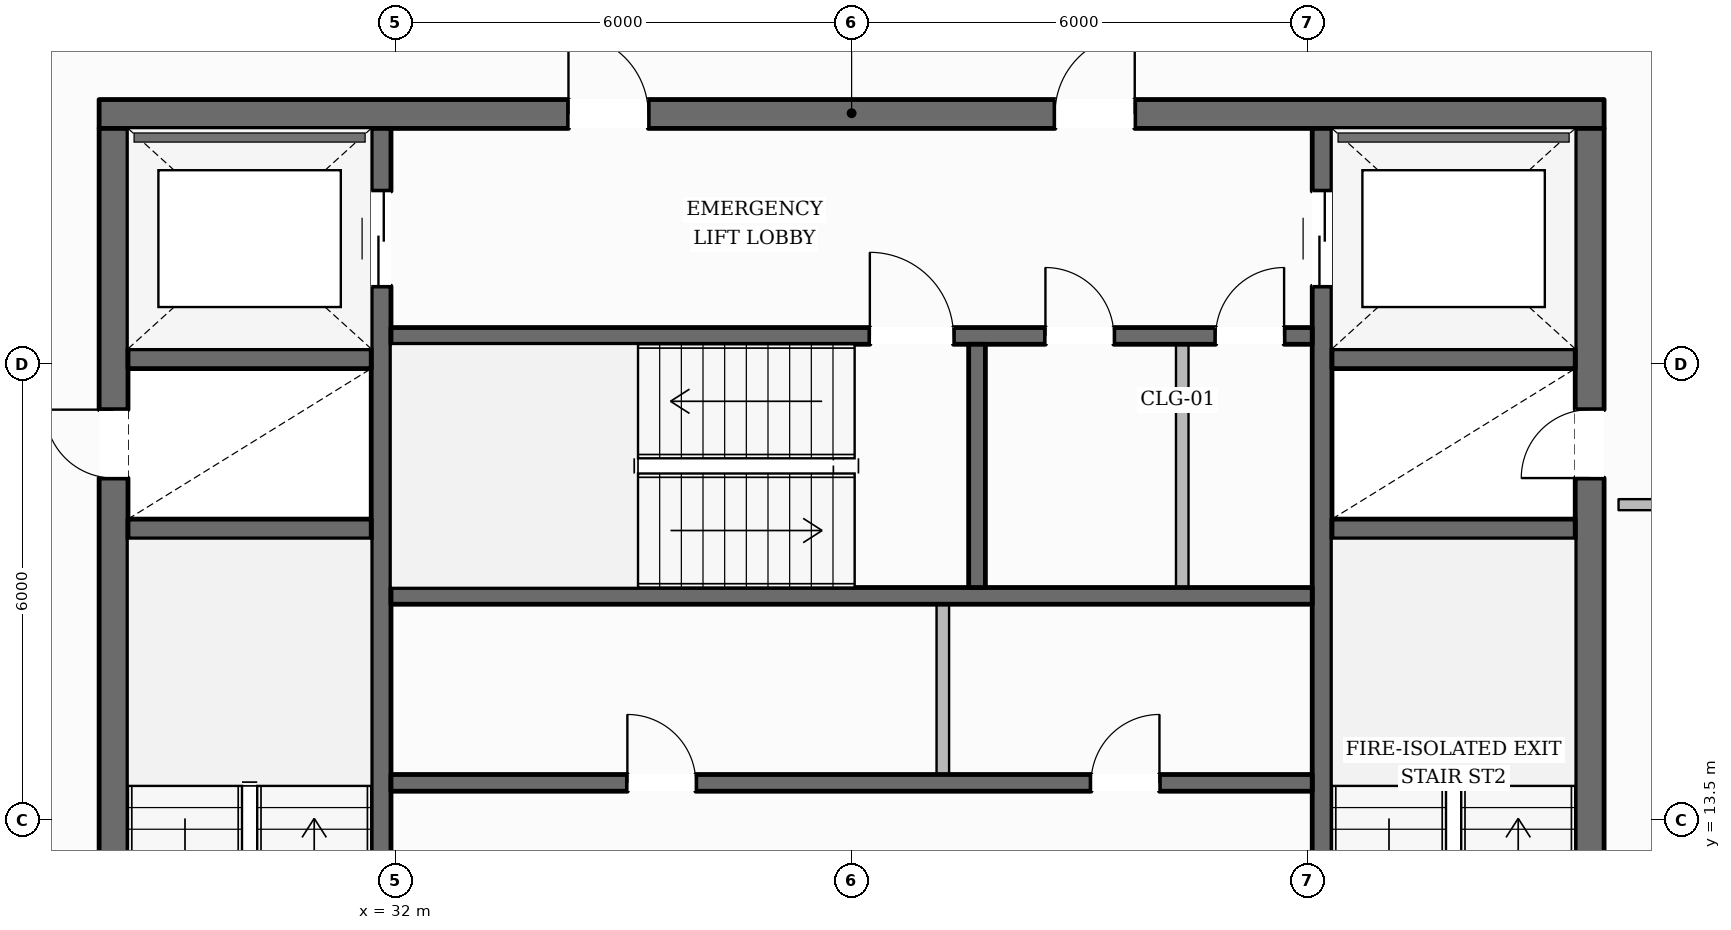
"""IFC4 building model, lengths in metres.
Left out: names, types, materials, properties, quantities, classifications, styles, units other than length and angle.
Written with IfcOpenShell. Run it as: python <this file> out.ifc"""

import sys

from ifc_helpers import new_model, si_unit, direction, frame, frame_2d, origin, place, context, subcontext, project, spatial, rectangle, extrude, element, fill, save


model = new_model("IFC4")
c1 = context("Model", 3, precision=1e-05, world=origin(), true_north=direction((0.0, 1.0)))
c2 = subcontext(c1, "Body", "Model", "MODEL_VIEW")
j1 = project(units=[si_unit("LENGTHUNIT", "METRE"), si_unit("PLANEANGLEUNIT", "RADIAN")], contexts=[c1])
p1 = place(None, origin())
s1 = spatial("IfcSite", under=j1, at=p1, CompositionType="ELEMENT")
p2 = place(p1, origin())
s2 = spatial("IfcBuilding", under=s1, at=p2, CompositionType="ELEMENT")
p3 = place(p2, frame((0.0, 0.0, 281.85)))
s3 = spatial("IfcBuildingStorey", under=s2, at=p3, CompositionType="ELEMENT", Elevation=281.85)
p4 = place(p3, frame((28.1, 22.79, 0.0), z_axis=(0.0, 0.0, 1.0), x_axis=(1.0, 0.0, 0.0)))
e1 = element("IfcWall", 1, at=p4, inside=s3, PredefinedType="SOLIDWALL", context=c2, shape_type="SweptSolid", body=[
    extrude(rectangle(XDim=19.8, YDim=0.38, at=frame_2d((9.9, 0.0))), origin(), (0.0, 0.0, 1.0), 3.61),
])
p5 = place(p4, frame((6.175, 0.0, 0.0)))
e2 = element("IfcOpeningElement", 2, at=p5, cuts=e1, PredefinedType="OPENING", context=c2, shape_type="SweptSolid", body=[
    extrude(rectangle(XDim=1.05, YDim=2.15, at=frame_2d((0.525, 1.075))), frame((0.0, 0.2, 0.0), z_axis=(0.0, -1.0, 0.0), x_axis=(1.0, 0.0, 0.0)), (0.0, 0.0, 1.0), 0.4),
])
p6 = place(p4, frame((12.575, 0.0, 0.0)))
e3 = element("IfcOpeningElement", 3, at=p6, cuts=e1, PredefinedType="OPENING", context=c2, shape_type="SweptSolid", body=[
    extrude(rectangle(XDim=1.05, YDim=2.15, at=frame_2d((0.525, 1.075))), frame((0.0, 0.2, 0.0), z_axis=(0.0, -1.0, 0.0), x_axis=(1.0, 0.0, 0.0)), (0.0, 0.0, 1.0), 0.4),
])
p7 = place(p3, frame((28.29, 9.6, 0.0), z_axis=(0.0, 0.0, 1.0), x_axis=(0.0, 1.0, 0.0)))
e4 = element("IfcWall", 4, at=p7, inside=s3, PredefinedType="SOLIDWALL", context=c2, shape_type="SweptSolid", body=[
    extrude(rectangle(XDim=13.0, YDim=0.38, at=frame_2d((6.5, 0.0))), origin(), (0.0, 0.0, 1.0), 3.61),
])
p8 = place(p7, frame((0.2, 0.0, 0.0)))
e5 = element("IfcOpeningElement", 5, at=p8, cuts=e4, PredefinedType="OPENING", context=c2, shape_type="SweptSolid", body=[
    extrude(rectangle(XDim=1.1, YDim=2.15, at=frame_2d((0.55, 1.075))), frame((0.0, 0.2, 0.0), z_axis=(0.0, -1.0, 0.0), x_axis=(1.0, 0.0, 0.0)), (0.0, 0.0, 1.0), 0.4),
])
p9 = place(p7, frame((8.4, 0.0, 0.0)))
e6 = element("IfcOpeningElement", 6, at=p9, cuts=e4, PredefinedType="OPENING", context=c2, shape_type="SweptSolid", body=[
    extrude(rectangle(XDim=0.9, YDim=2.1, at=frame_2d((0.45, 1.05))), frame((0.0, 0.2, 0.0), z_axis=(0.0, -1.0, 0.0), x_axis=(1.0, 0.0, 0.0)), (0.0, 0.0, 1.0), 0.4),
])
p10 = place(p3, frame((47.71, 9.6, 0.0), z_axis=(0.0, 0.0, 1.0), x_axis=(0.0, 1.0, 0.0)))
e7 = element("IfcWall", 7, at=p10, inside=s3, PredefinedType="SOLIDWALL", context=c2, shape_type="SweptSolid", body=[
    extrude(rectangle(XDim=13.0, YDim=0.38, at=frame_2d((6.5, 0.0))), origin(), (0.0, 0.0, 1.0), 3.61),
])
p11 = place(p10, frame((0.2, 0.0, 0.0)))
e8 = element("IfcOpeningElement", 8, at=p11, cuts=e7, PredefinedType="OPENING", context=c2, shape_type="SweptSolid", body=[
    extrude(rectangle(XDim=1.1, YDim=2.15, at=frame_2d((0.55, 1.075))), frame((0.0, 0.2, 0.0), z_axis=(0.0, -1.0, 0.0), x_axis=(1.0, 0.0, 0.0)), (0.0, 0.0, 1.0), 0.4),
])
p12 = place(p10, frame((8.4, 0.0, 0.0)))
e9 = element("IfcOpeningElement", 9, at=p12, cuts=e7, PredefinedType="OPENING", context=c2, shape_type="SweptSolid", body=[
    extrude(rectangle(XDim=0.9, YDim=2.1, at=frame_2d((0.45, 1.05))), frame((0.0, 0.2, 0.0), z_axis=(0.0, -1.0, 0.0), x_axis=(1.0, 0.0, 0.0)), (0.0, 0.0, 1.0), 0.4),
])
p13 = place(p3, frame((31.81, 9.6, 0.0), z_axis=(0.0, 0.0, 1.0), x_axis=(0.0, 1.0, 0.0)))
e10 = element("IfcWall", 10, at=p13, inside=s3, PredefinedType="SHEAR", context=c2, shape_type="SweptSolid", body=[
    extrude(rectangle(XDim=13.0, YDim=0.26, at=frame_2d((6.5, 0.0))), origin(), (0.0, 0.0, 1.0), 3.61),
])
p14 = place(p13, frame((10.925, 0.0, 0.0)))
e11 = element("IfcOpeningElement", 11, at=p14, cuts=e10, PredefinedType="OPENING", context=c2, shape_type="SweptSolid", body=[
    extrude(rectangle(XDim=1.25, YDim=2.25, at=frame_2d((0.625, 1.125))), frame((0.0, 0.14, 0.0), z_axis=(0.0, -1.0, 0.0), x_axis=(1.0, 0.0, 0.0)), (0.0, 0.0, 1.0), 0.28),
])
p15 = place(p3, frame((44.19, 9.6, 0.0), z_axis=(0.0, 0.0, 1.0), x_axis=(0.0, 1.0, 0.0)))
e12 = element("IfcWall", 12, at=p15, inside=s3, PredefinedType="SHEAR", context=c2, shape_type="SweptSolid", body=[
    extrude(rectangle(XDim=13.0, YDim=0.26, at=frame_2d((6.5, 0.0))), origin(), (0.0, 0.0, 1.0), 3.61),
])
p16 = place(p15, frame((10.925, 0.0, 0.0)))
e13 = element("IfcOpeningElement", 13, at=p16, cuts=e12, PredefinedType="OPENING", context=c2, shape_type="SweptSolid", body=[
    extrude(rectangle(XDim=1.25, YDim=2.25, at=frame_2d((0.625, 1.125))), frame((0.0, 0.14, 0.0), z_axis=(0.0, -1.0, 0.0), x_axis=(1.0, 0.0, 0.0)), (0.0, 0.0, 1.0), 0.28),
])
for number, where, z_axis, x_axis in (
    (14, (28.48, 17.33, 0.0), (0.0, 0.0, 1.0), (1.0, 0.0, 0.0)),
    (15, (28.48, 19.57, 0.0), (0.0, 0.0, 1.0), (1.0, 0.0, 0.0)),
    (16, (44.32, 17.33, 0.0), (0.0, 0.0, 1.0), (1.0, 0.0, 0.0)),
    (17, (44.32, 19.57, 0.0), (0.0, 0.0, 1.0), (1.0, 0.0, 0.0)),
):
    element("IfcWall", number, at=place(p3, frame(where, z_axis=z_axis, x_axis=x_axis)), inside=s3, PredefinedType="SHEAR", context=c2, shape_type="SweptSolid", body=[
        extrude(rectangle(XDim=3.2, YDim=0.26, at=frame_2d((1.6, 0.0))), origin(), (0.0, 0.0, 1.0), 3.61),
    ])
p17 = place(p3, frame((31.94, 19.87, 0.0), z_axis=(0.0, 0.0, 1.0), x_axis=(1.0, 0.0, 0.0)))
e18 = element("IfcWall", 18, at=p17, inside=s3, PredefinedType="SOLIDWALL", context=c2, shape_type="SweptSolid", body=[
    extrude(rectangle(XDim=12.12, YDim=0.22, at=frame_2d((6.06, 0.0))), origin(), (0.0, 0.0, 1.0), 3.61),
])
p18 = place(p17, frame((6.3, 0.0, 0.0)))
e19 = element("IfcOpeningElement", 19, at=p18, cuts=e18, PredefinedType="OPENING", context=c2, shape_type="SweptSolid", body=[
    extrude(rectangle(XDim=1.1, YDim=2.15, at=frame_2d((0.55, 1.075))), frame((0.0, 0.12, 0.0), z_axis=(0.0, -1.0, 0.0), x_axis=(1.0, 0.0, 0.0)), (0.0, 0.0, 1.0), 0.24),
])
p19 = place(p17, frame((8.61, 0.0, 0.0)))
e20 = element("IfcOpeningElement", 20, at=p19, cuts=e18, PredefinedType="OPENING", context=c2, shape_type="SweptSolid", body=[
    extrude(rectangle(XDim=0.9, YDim=2.1, at=frame_2d((0.45, 1.05))), frame((0.0, 0.12, 0.0), z_axis=(0.0, -1.0, 0.0), x_axis=(1.0, 0.0, 0.0)), (0.0, 0.0, 1.0), 0.24),
])
p20 = place(p17, frame((10.85, 0.0, 0.0)))
e21 = element("IfcOpeningElement", 21, at=p20, cuts=e18, PredefinedType="OPENING", context=c2, shape_type="SweptSolid", body=[
    extrude(rectangle(XDim=0.9, YDim=2.1, at=frame_2d((0.45, 1.05))), frame((0.0, 0.12, 0.0), z_axis=(0.0, -1.0, 0.0), x_axis=(1.0, 0.0, 0.0)), (0.0, 0.0, 1.0), 0.24),
])
p21 = place(p3, frame((31.94, 16.45, 0.0), z_axis=(0.0, 0.0, 1.0), x_axis=(1.0, 0.0, 0.0)))
e22 = element("IfcWall", 22, at=p21, inside=s3, PredefinedType="SOLIDWALL", context=c2, shape_type="SweptSolid", body=[
    extrude(rectangle(XDim=12.12, YDim=0.22, at=frame_2d((6.06, 0.0))), origin(), (0.0, 0.0, 1.0), 3.61),
])
p22 = place(p3, frame((39.65, 16.56, 0.0), z_axis=(0.0, 0.0, 1.0), x_axis=(0.0, 1.0, 0.0)))
e23 = element("IfcWall", 23, at=p22, inside=s3, PredefinedType="SOLIDWALL", context=c2, shape_type="SweptSolid", body=[
    extrude(rectangle(XDim=3.2, YDim=0.22, at=frame_2d((1.6, 0.0))), origin(), (0.0, 0.0, 1.0), 3.61),
])
p23 = place(p3, frame((31.94, 13.99, 0.0), z_axis=(0.0, 0.0, 1.0), x_axis=(1.0, 0.0, 0.0)))
e24 = element("IfcWall", 24, at=p23, inside=s3, PredefinedType="SOLIDWALL", context=c2, shape_type="SweptSolid", body=[
    extrude(rectangle(XDim=12.12, YDim=0.22, at=frame_2d((6.06, 0.0))), origin(), (0.0, 0.0, 1.0), 3.61),
])
p24 = place(p23, frame((3.11, 0.0, 0.0)))
e25 = element("IfcOpeningElement", 25, at=p24, cuts=e24, PredefinedType="OPENING", context=c2, shape_type="SweptSolid", body=[
    extrude(rectangle(XDim=0.9, YDim=2.1, at=frame_2d((0.45, 1.05))), frame((0.0, 0.12, 0.0), z_axis=(0.0, -1.0, 0.0), x_axis=(1.0, 0.0, 0.0)), (0.0, 0.0, 1.0), 0.24),
])
p25 = place(p23, frame((9.21, 0.0, 0.0)))
e26 = element("IfcOpeningElement", 26, at=p25, cuts=e24, PredefinedType="OPENING", context=c2, shape_type="SweptSolid", body=[
    extrude(rectangle(XDim=0.9, YDim=2.1, at=frame_2d((0.45, 1.05))), frame((0.0, 0.12, 0.0), z_axis=(0.0, -1.0, 0.0), x_axis=(1.0, 0.0, 0.0)), (0.0, 0.0, 1.0), 0.24),
])
p26 = place(p3, frame((15.219, 10.076, 0.0), z_axis=(0.0, 0.0, 1.0), x_axis=(0.509799642177, 0.860293162147, 0.0)))
e27 = element("IfcWall", 27, at=p26, inside=s3, PredefinedType="STANDARD", context=c2, shape_type="SweptSolid", body=[
    extrude(rectangle(XDim=38.963, YDim=0.35, at=frame_2d((19.481, 0.0))), origin(), (0.0, 0.0, 1.0), 3.196),
])
p27 = place(p26, frame((34.65, 0.0, 0.65)))
e28 = element("IfcOpeningElement", 28, at=p27, cuts=e27, PredefinedType="OPENING", context=c2, shape_type="SweptSolid", body=[
    extrude(rectangle(XDim=1.35, YDim=1.75, at=frame_2d((0.675, 0.875))), frame((0.0, 0.185, 0.0), z_axis=(0.0, -1.0, 0.0), x_axis=(1.0, 0.0, 0.0)), (0.0, 0.0, 1.0), 0.37),
])
p28 = place(p26, frame((28.314, 0.0, 0.65)))
e29 = element("IfcOpeningElement", 29, at=p28, cuts=e27, PredefinedType="OPENING", context=c2, shape_type="SweptSolid", body=[
    extrude(rectangle(XDim=1.35, YDim=1.75, at=frame_2d((0.675, 0.875))), frame((0.0, 0.185, 0.0), z_axis=(0.0, -1.0, 0.0), x_axis=(1.0, 0.0, 0.0)), (0.0, 0.0, 1.0), 0.37),
])
p29 = place(p26, frame((15.645, 0.0, 0.65)))
e30 = element("IfcOpeningElement", 30, at=p29, cuts=e27, PredefinedType="OPENING", context=c2, shape_type="SweptSolid", body=[
    extrude(rectangle(XDim=1.35, YDim=1.75, at=frame_2d((0.675, 0.875))), frame((0.0, 0.185, 0.0), z_axis=(0.0, -1.0, 0.0), x_axis=(1.0, 0.0, 0.0)), (0.0, 0.0, 1.0), 0.37),
])
p30 = place(p26, frame((9.309, 0.0, 0.65)))
e31 = element("IfcOpeningElement", 31, at=p30, cuts=e27, PredefinedType="OPENING", context=c2, shape_type="SweptSolid", body=[
    extrude(rectangle(XDim=1.35, YDim=1.75, at=frame_2d((0.675, 0.875))), frame((0.0, 0.185, 0.0), z_axis=(0.0, -1.0, 0.0), x_axis=(1.0, 0.0, 0.0)), (0.0, 0.0, 1.0), 0.37),
])
p31 = place(p26, frame((2.974, 0.0, 0.65)))
e32 = element("IfcOpeningElement", 32, at=p31, cuts=e27, PredefinedType="OPENING", context=c2, shape_type="SweptSolid", body=[
    extrude(rectangle(XDim=1.35, YDim=1.75, at=frame_2d((0.675, 0.875))), frame((0.0, 0.185, 0.0), z_axis=(0.0, -1.0, 0.0), x_axis=(1.0, 0.0, 0.0)), (0.0, 0.0, 1.0), 0.37),
])
p32 = place(p3, frame((40.827, 43.65, 0.0), z_axis=(0.0, 0.0, 1.0), x_axis=(0.502670175865, -0.864478278672, 0.0)))
e33 = element("IfcWall", 33, at=p32, inside=s3, PredefinedType="STANDARD", context=c2, shape_type="SweptSolid", body=[
    extrude(rectangle(XDim=38.406, YDim=0.35, at=frame_2d((19.203, 0.0))), origin(), (0.0, 0.0, 1.0), 3.196),
])
p33 = place(p32, frame((34.128, 0.0, 0.65)))
e34 = element("IfcOpeningElement", 34, at=p33, cuts=e33, PredefinedType="OPENING", context=c2, shape_type="SweptSolid", body=[
    extrude(rectangle(XDim=1.35, YDim=1.75, at=frame_2d((0.675, 0.875))), frame((0.0, 0.185, 0.0), z_axis=(0.0, -1.0, 0.0), x_axis=(1.0, 0.0, 0.0)), (0.0, 0.0, 1.0), 0.37),
])
p34 = place(p32, frame((27.888, 0.0, 0.65)))
e35 = element("IfcOpeningElement", 35, at=p34, cuts=e33, PredefinedType="OPENING", context=c2, shape_type="SweptSolid", body=[
    extrude(rectangle(XDim=1.35, YDim=1.75, at=frame_2d((0.675, 0.875))), frame((0.0, 0.185, 0.0), z_axis=(0.0, -1.0, 0.0), x_axis=(1.0, 0.0, 0.0)), (0.0, 0.0, 1.0), 0.37),
])
p35 = place(p32, frame((15.406, 0.0, 0.65)))
e36 = element("IfcOpeningElement", 36, at=p35, cuts=e33, PredefinedType="OPENING", context=c2, shape_type="SweptSolid", body=[
    extrude(rectangle(XDim=1.35, YDim=1.75, at=frame_2d((0.675, 0.875))), frame((0.0, 0.185, 0.0), z_axis=(0.0, -1.0, 0.0), x_axis=(1.0, 0.0, 0.0)), (0.0, 0.0, 1.0), 0.37),
])
p36 = place(p32, frame((9.165, 0.0, 0.65)))
e37 = element("IfcOpeningElement", 37, at=p36, cuts=e33, PredefinedType="OPENING", context=c2, shape_type="SweptSolid", body=[
    extrude(rectangle(XDim=1.35, YDim=1.75, at=frame_2d((0.675, 0.875))), frame((0.0, 0.185, 0.0), z_axis=(0.0, -1.0, 0.0), x_axis=(1.0, 0.0, 0.0)), (0.0, 0.0, 1.0), 0.37),
])
p37 = place(p32, frame((2.924, 0.0, 0.65)))
e38 = element("IfcOpeningElement", 38, at=p37, cuts=e33, PredefinedType="OPENING", context=c2, shape_type="SweptSolid", body=[
    extrude(rectangle(XDim=1.35, YDim=1.75, at=frame_2d((0.675, 0.875))), frame((0.0, 0.185, 0.0), z_axis=(0.0, -1.0, 0.0), x_axis=(1.0, 0.0, 0.0)), (0.0, 0.0, 1.0), 0.37),
])
p38 = place(p3, frame((39.2, 14.1, 0.0), z_axis=(0.0, 0.0, 1.0), x_axis=(0.0, 1.0, 0.0)))
e39 = element("IfcWall", 39, at=p38, inside=s3, PredefinedType="PARTITIONING", context=c2, shape_type="SweptSolid", body=[
    extrude(rectangle(XDim=2.24, YDim=0.165, at=frame_2d((1.12, 0.0))), origin(), (0.0, 0.0, 1.0), 3.61),
])
p39 = place(p3, frame((42.35, 16.56, 0.0), z_axis=(0.0, 0.0, 1.0), x_axis=(0.0, 1.0, 0.0)))
e40 = element("IfcWall", 40, at=p39, inside=s3, PredefinedType="PARTITIONING", context=c2, shape_type="SweptSolid", body=[
    extrude(rectangle(XDim=3.2, YDim=0.165, at=frame_2d((1.6, 0.0))), origin(), (0.0, 0.0, 1.0), 3.61),
])
p40 = place(p3, frame((49.91, 17.65, 0.0), z_axis=(0.0, 0.0, 1.0), x_axis=(-1.0, 0.0, 0.0)))
e41 = element("IfcWall", 41, at=p40, inside=s3, PredefinedType="PARTITIONING", context=c2, shape_type="SweptSolid", body=[
    extrude(rectangle(XDim=1.82, YDim=0.145, at=frame_2d((0.91, 0.0))), origin(), (0.0, 0.0, 1.0), 3.61),
])
p41 = place(p18, origin())
e42 = element("IfcDoor", 42, at=p41, inside=s3, OperationType="SINGLE_SWING_LEFT", PredefinedType="DOOR", context=c2, shape_type="SweptSolid", body=[
    extrude(rectangle(XDim=1.1, YDim=2.15, at=frame_2d((0.55, 1.075))), frame((0.0, 0.025, 0.0), z_axis=(0.0, -1.0, 0.0), x_axis=(1.0, 0.0, 0.0)), (0.0, 0.0, 1.0), 0.05),
])
fill(e19, e42)
p42 = place(p9, origin())
e43 = element("IfcDoor", 43, at=p42, inside=s3, OperationType="SINGLE_SWING_RIGHT", PredefinedType="DOOR", context=c2, shape_type="SweptSolid", body=[
    extrude(rectangle(XDim=0.9, YDim=2.1, at=frame_2d((0.45, 1.05))), frame((0.0, 0.025, 0.0), z_axis=(0.0, -1.0, 0.0), x_axis=(1.0, 0.0, 0.0)), (0.0, 0.0, 1.0), 0.05),
])
fill(e6, e43)
p43 = place(p12, origin())
e44 = element("IfcDoor", 44, at=p43, inside=s3, OperationType="SINGLE_SWING_LEFT", PredefinedType="DOOR", context=c2, shape_type="SweptSolid", body=[
    extrude(rectangle(XDim=0.9, YDim=2.1, at=frame_2d((0.45, 1.05))), frame((0.0, 0.025, 0.0), z_axis=(0.0, -1.0, 0.0), x_axis=(1.0, 0.0, 0.0)), (0.0, 0.0, 1.0), 0.05),
])
fill(e9, e44)
p44 = place(p5, origin())
e45 = element("IfcDoor", 45, at=p44, inside=s3, OperationType="SINGLE_SWING_LEFT", PredefinedType="DOOR", context=c2, shape_type="SweptSolid", body=[
    extrude(rectangle(XDim=1.05, YDim=2.15, at=frame_2d((0.525, 1.075))), frame((0.0, 0.025, 0.0), z_axis=(0.0, -1.0, 0.0), x_axis=(1.0, 0.0, 0.0)), (0.0, 0.0, 1.0), 0.05),
])
fill(e2, e45)
p45 = place(p6, origin())
e46 = element("IfcDoor", 46, at=p45, inside=s3, OperationType="SINGLE_SWING_RIGHT", PredefinedType="DOOR", context=c2, shape_type="SweptSolid", body=[
    extrude(rectangle(XDim=1.05, YDim=2.15, at=frame_2d((0.525, 1.075))), frame((0.0, 0.025, 0.0), z_axis=(0.0, -1.0, 0.0), x_axis=(1.0, 0.0, 0.0)), (0.0, 0.0, 1.0), 0.05),
])
fill(e3, e46)
p46 = place(p14, origin())
e47 = element("IfcDoor", 47, at=p46, inside=s3, OperationType="DOUBLE_DOOR_SLIDING", PredefinedType="DOOR", context=c2, shape_type="SweptSolid", body=[
    extrude(rectangle(XDim=1.25, YDim=2.25, at=frame_2d((0.625, 1.125))), frame((0.0, 0.025, 0.0), z_axis=(0.0, -1.0, 0.0), x_axis=(1.0, 0.0, 0.0)), (0.0, 0.0, 1.0), 0.05),
])
fill(e11, e47)
p47 = place(p16, origin())
e48 = element("IfcDoor", 48, at=p47, inside=s3, OperationType="DOUBLE_DOOR_SLIDING", PredefinedType="DOOR", context=c2, shape_type="SweptSolid", body=[
    extrude(rectangle(XDim=1.25, YDim=2.25, at=frame_2d((0.625, 1.125))), frame((0.0, 0.025, 0.0), z_axis=(0.0, -1.0, 0.0), x_axis=(1.0, 0.0, 0.0)), (0.0, 0.0, 1.0), 0.05),
])
fill(e13, e48)
p48 = place(p24, origin())
e49 = element("IfcDoor", 49, at=p48, inside=s3, OperationType="SINGLE_SWING_LEFT", PredefinedType="DOOR", context=c2, shape_type="SweptSolid", body=[
    extrude(rectangle(XDim=0.9, YDim=2.1, at=frame_2d((0.45, 1.05))), frame((0.0, 0.025, 0.0), z_axis=(0.0, -1.0, 0.0), x_axis=(1.0, 0.0, 0.0)), (0.0, 0.0, 1.0), 0.05),
])
fill(e25, e49)
p49 = place(p25, origin())
e50 = element("IfcDoor", 50, at=p49, inside=s3, OperationType="SINGLE_SWING_RIGHT", PredefinedType="DOOR", context=c2, shape_type="SweptSolid", body=[
    extrude(rectangle(XDim=0.9, YDim=2.1, at=frame_2d((0.45, 1.05))), frame((0.0, 0.025, 0.0), z_axis=(0.0, -1.0, 0.0), x_axis=(1.0, 0.0, 0.0)), (0.0, 0.0, 1.0), 0.05),
])
fill(e26, e50)
p50 = place(p19, origin())
e51 = element("IfcDoor", 51, at=p50, inside=s3, OperationType="SINGLE_SWING_LEFT", PredefinedType="DOOR", context=c2, shape_type="SweptSolid", body=[
    extrude(rectangle(XDim=0.9, YDim=2.1, at=frame_2d((0.45, 1.05))), frame((0.0, 0.025, 0.0), z_axis=(0.0, -1.0, 0.0), x_axis=(1.0, 0.0, 0.0)), (0.0, 0.0, 1.0), 0.05),
])
fill(e20, e51)
p51 = place(p20, origin())
e52 = element("IfcDoor", 52, at=p51, inside=s3, OperationType="SINGLE_SWING_RIGHT", PredefinedType="DOOR", context=c2, shape_type="SweptSolid", body=[
    extrude(rectangle(XDim=0.9, YDim=2.1, at=frame_2d((0.45, 1.05))), frame((0.0, 0.025, 0.0), z_axis=(0.0, -1.0, 0.0), x_axis=(1.0, 0.0, 0.0)), (0.0, 0.0, 1.0), 0.05),
])
fill(e21, e52)
save(model, sys.argv[1])
